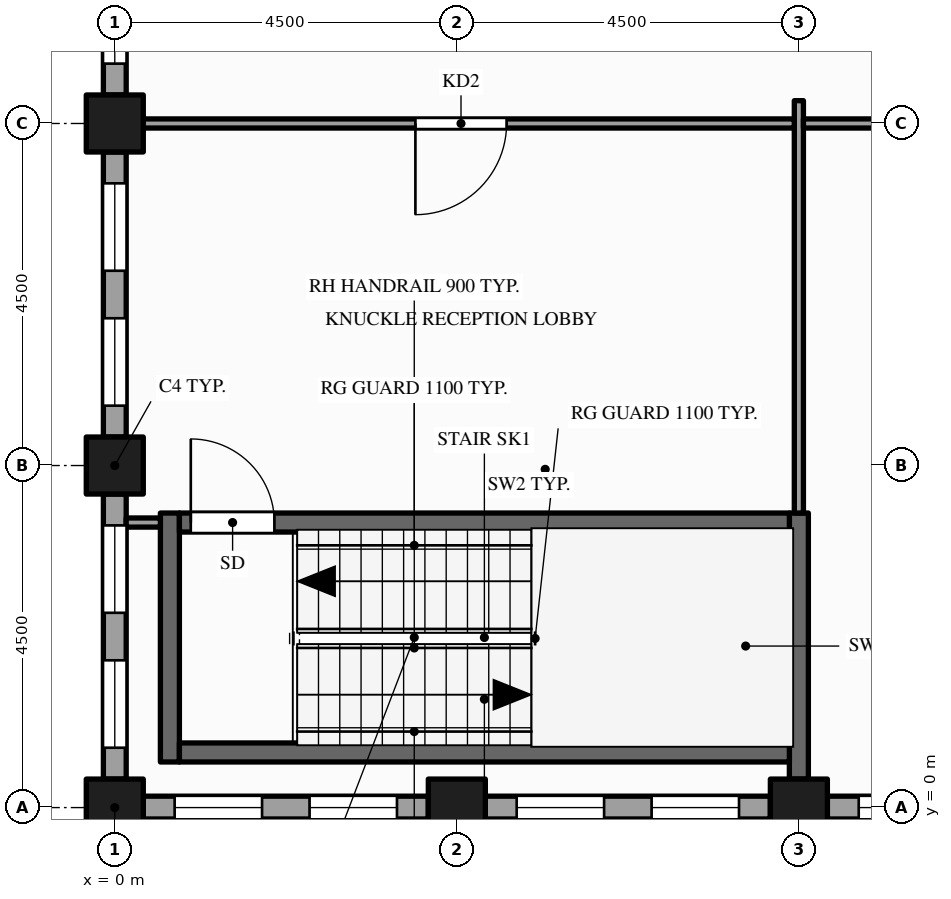
"""IFC4 building model, lengths in metres.
Left out: names, types, materials, properties, quantities, classifications, styles, units other than length and angle.
Written with IfcOpenShell. Run it as: python <this file> out.ifc"""

import sys

from ifc_helpers import new_model, si_unit, direction, frame, frame_2d, origin, origin_2d, place, context, subcontext, project, spatial, rectangle, hollow_rectangle, extrude, element, fill, save


model = new_model("IFC4")
c1 = context("Model", 3, precision=1e-05, world=origin(), true_north=direction((0.0, 1.0)))
c2 = subcontext(c1, "Body", "Model", "MODEL_VIEW")
j1 = project(units=[si_unit("LENGTHUNIT", "METRE"), si_unit("PLANEANGLEUNIT", "RADIAN")], contexts=[c1])
p1 = place(None, origin())
s1 = spatial("IfcSite", under=j1, at=p1, CompositionType="ELEMENT")
p2 = place(p1, origin())
s2 = spatial("IfcBuilding", under=s1, at=p2, CompositionType="ELEMENT")
p3 = place(p2, frame((0.0, 0.0, 195.0)))
s3 = spatial("IfcBuildingStorey", under=s2, at=p3, CompositionType="ELEMENT", Elevation=195.0)
for number, where, z_axis, x_axis in (
    (1, (0.0, 0.0, -0.15), (0.0, 0.0, 1.0), (1.0, 0.0, 0.0)),
    (2, (0.0, 4.5, -0.15), (0.0, 0.0, 1.0), (1.0, 0.0, 0.0)),
    (3, (0.0, 9.0, -0.15), (0.0, 0.0, 1.0), (1.0, 0.0, 0.0)),
    (4, (4.5, 0.0, -0.15), (0.0, 0.0, 1.0), (1.0, 0.0, 0.0)),
    (5, (9.0, 0.0, -0.15), (0.0, 0.0, 1.0), (1.0, 0.0, 0.0)),
):
    element("IfcColumn", number, at=place(p3, frame(where, z_axis=z_axis, x_axis=x_axis)), inside=s3, PredefinedType="COLUMN", context=c2, shape_type="SweptSolid", body=[
        extrude(hollow_rectangle(XDim=0.75, YDim=0.75, WallThickness=0.036, at=origin_2d()), origin(), (0.0, 0.0, 1.0), 4.0),
    ])
p4 = place(p3, frame((0.0, 13.125, 0.0), z_axis=(0.0, 0.0, 1.0), x_axis=(0.0, -1.0, 0.0)))
e6 = element("IfcWall", 6, at=p4, inside=s3, PredefinedType="STANDARD", context=c2, shape_type="SweptSolid", body=[
    extrude(rectangle(XDim=3.75, YDim=0.3, at=frame_2d((1.875, 0.0))), origin(), (0.0, 0.0, 1.0), 3.157),
])
p5 = place(p4, frame((0.413, 0.0, 0.9)))
e7 = element("IfcOpeningElement", 7, at=p5, cuts=e6, PredefinedType="OPENING", context=c2, shape_type="SweptSolid", body=[
    extrude(rectangle(XDim=1.15, YDim=2.0, at=frame_2d((0.575, 1.0))), frame((0.0, 0.16, 0.0), z_axis=(0.0, -1.0, 0.0), x_axis=(1.0, 0.0, 0.0)), (0.0, 0.0, 1.0), 0.32),
])
p6 = place(p4, frame((2.188, 0.0, 0.9)))
e8 = element("IfcOpeningElement", 8, at=p6, cuts=e6, PredefinedType="OPENING", context=c2, shape_type="SweptSolid", body=[
    extrude(rectangle(XDim=1.15, YDim=2.0, at=frame_2d((0.575, 1.0))), frame((0.0, 0.16, 0.0), z_axis=(0.0, -1.0, 0.0), x_axis=(1.0, 0.0, 0.0)), (0.0, 0.0, 1.0), 0.32),
])
p7 = place(p3, frame((0.0, 8.625, 0.0), z_axis=(0.0, 0.0, 1.0), x_axis=(0.0, -1.0, 0.0)))
e9 = element("IfcWall", 9, at=p7, inside=s3, PredefinedType="STANDARD", context=c2, shape_type="SweptSolid", body=[
    extrude(rectangle(XDim=3.75, YDim=0.3, at=frame_2d((1.875, 0.0))), origin(), (0.0, 0.0, 1.0), 3.157),
])
p8 = place(p7, frame((0.413, 0.0, 0.9)))
e10 = element("IfcOpeningElement", 10, at=p8, cuts=e9, PredefinedType="OPENING", context=c2, shape_type="SweptSolid", body=[
    extrude(rectangle(XDim=1.15, YDim=2.0, at=frame_2d((0.575, 1.0))), frame((0.0, 0.16, 0.0), z_axis=(0.0, -1.0, 0.0), x_axis=(1.0, 0.0, 0.0)), (0.0, 0.0, 1.0), 0.32),
])
p9 = place(p7, frame((2.188, 0.0, 0.9)))
e11 = element("IfcOpeningElement", 11, at=p9, cuts=e9, PredefinedType="OPENING", context=c2, shape_type="SweptSolid", body=[
    extrude(rectangle(XDim=1.15, YDim=2.0, at=frame_2d((0.575, 1.0))), frame((0.0, 0.16, 0.0), z_axis=(0.0, -1.0, 0.0), x_axis=(1.0, 0.0, 0.0)), (0.0, 0.0, 1.0), 0.32),
])
p10 = place(p3, frame((0.0, 4.125, 0.0), z_axis=(0.0, 0.0, 1.0), x_axis=(0.0, -1.0, 0.0)))
e12 = element("IfcWall", 12, at=p10, inside=s3, PredefinedType="STANDARD", context=c2, shape_type="SweptSolid", body=[
    extrude(rectangle(XDim=3.75, YDim=0.3, at=frame_2d((1.875, 0.0))), origin(), (0.0, 0.0, 1.0), 3.157),
])
p11 = place(p10, frame((0.413, 0.0, 0.9)))
e13 = element("IfcOpeningElement", 13, at=p11, cuts=e12, PredefinedType="OPENING", context=c2, shape_type="SweptSolid", body=[
    extrude(rectangle(XDim=1.15, YDim=2.0, at=frame_2d((0.575, 1.0))), frame((0.0, 0.16, 0.0), z_axis=(0.0, -1.0, 0.0), x_axis=(1.0, 0.0, 0.0)), (0.0, 0.0, 1.0), 0.32),
])
p12 = place(p10, frame((2.188, 0.0, 0.9)))
e14 = element("IfcOpeningElement", 14, at=p12, cuts=e12, PredefinedType="OPENING", context=c2, shape_type="SweptSolid", body=[
    extrude(rectangle(XDim=1.15, YDim=2.0, at=frame_2d((0.575, 1.0))), frame((0.0, 0.16, 0.0), z_axis=(0.0, -1.0, 0.0), x_axis=(1.0, 0.0, 0.0)), (0.0, 0.0, 1.0), 0.32),
])
p13 = place(p3, frame((0.375, 0.0, 0.0), z_axis=(0.0, 0.0, 1.0), x_axis=(1.0, 0.0, 0.0)))
e15 = element("IfcWall", 15, at=p13, inside=s3, PredefinedType="STANDARD", context=c2, shape_type="SweptSolid", body=[
    extrude(rectangle(XDim=3.75, YDim=0.3, at=frame_2d((1.875, 0.0))), origin(), (0.0, 0.0, 1.0), 3.157),
])
p14 = place(p13, frame((0.413, 0.0, 0.9)))
e16 = element("IfcOpeningElement", 16, at=p14, cuts=e15, PredefinedType="OPENING", context=c2, shape_type="SweptSolid", body=[
    extrude(rectangle(XDim=1.15, YDim=2.0, at=frame_2d((0.575, 1.0))), frame((0.0, 0.16, 0.0), z_axis=(0.0, -1.0, 0.0), x_axis=(1.0, 0.0, 0.0)), (0.0, 0.0, 1.0), 0.32),
])
p15 = place(p13, frame((2.188, 0.0, 0.9)))
e17 = element("IfcOpeningElement", 17, at=p15, cuts=e15, PredefinedType="OPENING", context=c2, shape_type="SweptSolid", body=[
    extrude(rectangle(XDim=1.15, YDim=2.0, at=frame_2d((0.575, 1.0))), frame((0.0, 0.16, 0.0), z_axis=(0.0, -1.0, 0.0), x_axis=(1.0, 0.0, 0.0)), (0.0, 0.0, 1.0), 0.32),
])
p16 = place(p3, frame((4.875, 0.0, 0.0), z_axis=(0.0, 0.0, 1.0), x_axis=(1.0, 0.0, 0.0)))
e18 = element("IfcWall", 18, at=p16, inside=s3, PredefinedType="STANDARD", context=c2, shape_type="SweptSolid", body=[
    extrude(rectangle(XDim=3.75, YDim=0.3, at=frame_2d((1.875, 0.0))), origin(), (0.0, 0.0, 1.0), 3.157),
])
p17 = place(p16, frame((0.413, 0.0, 0.9)))
e19 = element("IfcOpeningElement", 19, at=p17, cuts=e18, PredefinedType="OPENING", context=c2, shape_type="SweptSolid", body=[
    extrude(rectangle(XDim=1.15, YDim=2.0, at=frame_2d((0.575, 1.0))), frame((0.0, 0.16, 0.0), z_axis=(0.0, -1.0, 0.0), x_axis=(1.0, 0.0, 0.0)), (0.0, 0.0, 1.0), 0.32),
])
p18 = place(p16, frame((2.188, 0.0, 0.9)))
e20 = element("IfcOpeningElement", 20, at=p18, cuts=e18, PredefinedType="OPENING", context=c2, shape_type="SweptSolid", body=[
    extrude(rectangle(XDim=1.15, YDim=2.0, at=frame_2d((0.575, 1.0))), frame((0.0, 0.16, 0.0), z_axis=(0.0, -1.0, 0.0), x_axis=(1.0, 0.0, 0.0)), (0.0, 0.0, 1.0), 0.32),
])
p19 = place(p3, frame((9.375, 0.0, 0.0), z_axis=(0.0, 0.0, 1.0), x_axis=(1.0, 0.0, 0.0)))
e21 = element("IfcWall", 21, at=p19, inside=s3, PredefinedType="STANDARD", context=c2, shape_type="SweptSolid", body=[
    extrude(rectangle(XDim=3.75, YDim=0.3, at=frame_2d((1.875, 0.0))), origin(), (0.0, 0.0, 1.0), 2.87),
])
p20 = place(p19, frame((0.413, 0.0, 0.9)))
e22 = element("IfcOpeningElement", 22, at=p20, cuts=e21, PredefinedType="OPENING", context=c2, shape_type="SweptSolid", body=[
    extrude(rectangle(XDim=1.15, YDim=1.75, at=frame_2d((0.575, 0.875))), frame((0.0, 0.16, 0.0), z_axis=(0.0, -1.0, 0.0), x_axis=(1.0, 0.0, 0.0)), (0.0, 0.0, 1.0), 0.32),
])
p21 = place(p19, frame((2.188, 0.0, 0.9)))
e23 = element("IfcOpeningElement", 23, at=p21, cuts=e21, PredefinedType="OPENING", context=c2, shape_type="SweptSolid", body=[
    extrude(rectangle(XDim=1.15, YDim=1.75, at=frame_2d((0.575, 0.875))), frame((0.0, 0.16, 0.0), z_axis=(0.0, -1.0, 0.0), x_axis=(1.0, 0.0, 0.0)), (0.0, 0.0, 1.0), 0.32),
])
p22 = place(p3, frame((0.725, 0.6, 0.0), z_axis=(0.0, 0.0, 1.0), x_axis=(0.0, 1.0, 0.0)))
e24 = element("IfcWall", 24, at=p22, inside=s3, PredefinedType="SHEAR", context=c2, shape_type="SweptSolid", body=[
    extrude(rectangle(XDim=3.275, YDim=0.25, at=frame_2d((1.637, 0.0))), origin(), (0.0, 0.0, 1.0), 3.85),
])
p23 = place(p3, frame((9.0, 0.375, 0.0), z_axis=(0.0, 0.0, 1.0), x_axis=(0.0, 1.0, 0.0)))
e25 = element("IfcWall", 25, at=p23, inside=s3, PredefinedType="SHEAR", context=c2, shape_type="SweptSolid", body=[
    extrude(rectangle(XDim=3.5, YDim=0.25, at=frame_2d((1.75, 0.0))), origin(), (0.0, 0.0, 1.0), 3.85),
])
p24 = place(p3, frame((9.0, 3.875, 0.0), z_axis=(0.0, 0.0, 1.0), x_axis=(0.0, 1.0, 0.0)))
e26 = element("IfcWall", 26, at=p24, inside=s3, PredefinedType="PARTITIONING", context=c2, shape_type="SweptSolid", body=[
    extrude(rectangle(XDim=5.425, YDim=0.12, at=frame_2d((2.712, 0.0))), origin(), (0.0, 0.0, 1.0), 2.87),
])
p25 = place(p3, frame((0.85, 0.725, 0.0), z_axis=(0.0, 0.0, 1.0), x_axis=(1.0, 0.0, 0.0)))
e27 = element("IfcWall", 27, at=p25, inside=s3, PredefinedType="SHEAR", context=c2, shape_type="SweptSolid", body=[
    extrude(rectangle(XDim=8.025, YDim=0.25, at=frame_2d((4.012, 0.0))), origin(), (0.0, 0.0, 1.0), 3.85),
])
p26 = place(p3, frame((0.15, 3.75, 0.0), z_axis=(0.0, 0.0, 1.0), x_axis=(1.0, 0.0, 0.0)))
e28 = element("IfcWall", 28, at=p26, inside=s3, PredefinedType="PARTITIONING", context=c2, shape_type="SweptSolid", body=[
    extrude(rectangle(XDim=0.45, YDim=0.12, at=frame_2d((0.225, 0.0))), origin(), (0.0, 0.0, 1.0), 3.85),
])
p27 = place(p3, frame((0.85, 3.75, 0.0), z_axis=(0.0, 0.0, 1.0), x_axis=(1.0, 0.0, 0.0)))
e29 = element("IfcWall", 29, at=p27, inside=s3, PredefinedType="SHEAR", context=c2, shape_type="SweptSolid", body=[
    extrude(rectangle(XDim=8.025, YDim=0.25, at=frame_2d((4.012, 0.0))), origin(), (0.0, 0.0, 1.0), 3.85),
])
p28 = place(p27, frame((0.15, 0.0, 0.0)))
e30 = element("IfcOpeningElement", 30, at=p28, cuts=e29, PredefinedType="OPENING", context=c2, shape_type="SweptSolid", body=[
    extrude(rectangle(XDim=1.1, YDim=2.1, at=frame_2d((0.55, 1.05))), frame((0.0, 0.135, 0.0), z_axis=(0.0, -1.0, 0.0), x_axis=(1.0, 0.0, 0.0)), (0.0, 0.0, 1.0), 0.27),
])
p29 = place(p3, frame((0.15, 9.0, 0.0), z_axis=(0.0, 0.0, 1.0), x_axis=(1.0, 0.0, 0.0)))
e31 = element("IfcWall", 31, at=p29, inside=s3, PredefinedType="PARTITIONING", context=c2, shape_type="SweptSolid", body=[
    extrude(rectangle(XDim=8.79, YDim=0.12, at=frame_2d((4.395, 0.0))), origin(), (0.0, 0.0, 1.0), 2.87),
])
p30 = place(p29, frame((3.805, 0.0, 0.0)))
e32 = element("IfcOpeningElement", 32, at=p30, cuts=e31, PredefinedType="OPENING", context=c2, shape_type="SweptSolid", body=[
    extrude(rectangle(XDim=1.2, YDim=2.1, at=frame_2d((0.6, 1.05))), frame((0.0, 0.07, 0.0), z_axis=(0.0, -1.0, 0.0), x_axis=(1.0, 0.0, 0.0)), (0.0, 0.0, 1.0), 0.14),
])
p31 = place(p3, frame((9.06, 9.0, 0.0), z_axis=(0.0, 0.0, 1.0), x_axis=(1.0, 0.0, 0.0)))
e33 = element("IfcWall", 33, at=p31, inside=s3, PredefinedType="PARTITIONING", context=c2, shape_type="SweptSolid", body=[
    extrude(rectangle(XDim=4.38, YDim=0.12, at=frame_2d((2.19, 0.0))), origin(), (0.0, 0.0, 1.0), 2.87),
])
p32 = place(p31, frame((1.69, 0.0, 0.0)))
e34 = element("IfcOpeningElement", 34, at=p32, cuts=e33, PredefinedType="OPENING", context=c2, shape_type="SweptSolid", body=[
    extrude(rectangle(XDim=1.0, YDim=2.1, at=frame_2d((0.5, 1.05))), frame((0.0, 0.07, 0.0), z_axis=(0.0, -1.0, 0.0), x_axis=(1.0, 0.0, 0.0)), (0.0, 0.0, 1.0), 0.14),
])
p33 = place(p6, origin())
e35 = element("IfcWindow", 35, at=p33, inside=s3, PartitioningType="SINGLE_PANEL", PredefinedType="WINDOW", context=c2, shape_type="SweptSolid", body=[
    extrude(rectangle(XDim=1.15, YDim=2.0, at=frame_2d((0.575, 1.0))), frame((0.0, 0.03, 0.0), z_axis=(0.0, -1.0, 0.0), x_axis=(1.0, 0.0, 0.0)), (0.0, 0.0, 1.0), 0.06),
])
fill(e8, e35)
p34 = place(p8, origin())
e36 = element("IfcWindow", 36, at=p34, inside=s3, PartitioningType="SINGLE_PANEL", PredefinedType="WINDOW", context=c2, shape_type="SweptSolid", body=[
    extrude(rectangle(XDim=1.15, YDim=2.0, at=frame_2d((0.575, 1.0))), frame((0.0, 0.03, 0.0), z_axis=(0.0, -1.0, 0.0), x_axis=(1.0, 0.0, 0.0)), (0.0, 0.0, 1.0), 0.06),
])
fill(e10, e36)
p35 = place(p9, origin())
e37 = element("IfcWindow", 37, at=p35, inside=s3, PartitioningType="SINGLE_PANEL", PredefinedType="WINDOW", context=c2, shape_type="SweptSolid", body=[
    extrude(rectangle(XDim=1.15, YDim=2.0, at=frame_2d((0.575, 1.0))), frame((0.0, 0.03, 0.0), z_axis=(0.0, -1.0, 0.0), x_axis=(1.0, 0.0, 0.0)), (0.0, 0.0, 1.0), 0.06),
])
fill(e11, e37)
p36 = place(p11, origin())
e38 = element("IfcWindow", 38, at=p36, inside=s3, PartitioningType="SINGLE_PANEL", PredefinedType="WINDOW", context=c2, shape_type="SweptSolid", body=[
    extrude(rectangle(XDim=1.15, YDim=2.0, at=frame_2d((0.575, 1.0))), frame((0.0, 0.03, 0.0), z_axis=(0.0, -1.0, 0.0), x_axis=(1.0, 0.0, 0.0)), (0.0, 0.0, 1.0), 0.06),
])
fill(e13, e38)
p37 = place(p12, origin())
e39 = element("IfcWindow", 39, at=p37, inside=s3, PartitioningType="SINGLE_PANEL", PredefinedType="WINDOW", context=c2, shape_type="SweptSolid", body=[
    extrude(rectangle(XDim=1.15, YDim=2.0, at=frame_2d((0.575, 1.0))), frame((0.0, 0.03, 0.0), z_axis=(0.0, -1.0, 0.0), x_axis=(1.0, 0.0, 0.0)), (0.0, 0.0, 1.0), 0.06),
])
fill(e14, e39)
p38 = place(p14, origin())
e40 = element("IfcWindow", 40, at=p38, inside=s3, PartitioningType="SINGLE_PANEL", PredefinedType="WINDOW", context=c2, shape_type="SweptSolid", body=[
    extrude(rectangle(XDim=1.15, YDim=2.0, at=frame_2d((0.575, 1.0))), frame((0.0, 0.03, 0.0), z_axis=(0.0, -1.0, 0.0), x_axis=(1.0, 0.0, 0.0)), (0.0, 0.0, 1.0), 0.06),
])
fill(e16, e40)
p39 = place(p15, origin())
e41 = element("IfcWindow", 41, at=p39, inside=s3, PartitioningType="SINGLE_PANEL", PredefinedType="WINDOW", context=c2, shape_type="SweptSolid", body=[
    extrude(rectangle(XDim=1.15, YDim=2.0, at=frame_2d((0.575, 1.0))), frame((0.0, 0.03, 0.0), z_axis=(0.0, -1.0, 0.0), x_axis=(1.0, 0.0, 0.0)), (0.0, 0.0, 1.0), 0.06),
])
fill(e17, e41)
p40 = place(p17, origin())
e42 = element("IfcWindow", 42, at=p40, inside=s3, PartitioningType="SINGLE_PANEL", PredefinedType="WINDOW", context=c2, shape_type="SweptSolid", body=[
    extrude(rectangle(XDim=1.15, YDim=2.0, at=frame_2d((0.575, 1.0))), frame((0.0, 0.03, 0.0), z_axis=(0.0, -1.0, 0.0), x_axis=(1.0, 0.0, 0.0)), (0.0, 0.0, 1.0), 0.06),
])
fill(e19, e42)
p41 = place(p18, origin())
e43 = element("IfcWindow", 43, at=p41, inside=s3, PartitioningType="SINGLE_PANEL", PredefinedType="WINDOW", context=c2, shape_type="SweptSolid", body=[
    extrude(rectangle(XDim=1.15, YDim=2.0, at=frame_2d((0.575, 1.0))), frame((0.0, 0.03, 0.0), z_axis=(0.0, -1.0, 0.0), x_axis=(1.0, 0.0, 0.0)), (0.0, 0.0, 1.0), 0.06),
])
fill(e20, e43)
p42 = place(p20, origin())
e44 = element("IfcWindow", 44, at=p42, inside=s3, PartitioningType="SINGLE_PANEL", PredefinedType="WINDOW", context=c2, shape_type="SweptSolid", body=[
    extrude(rectangle(XDim=1.15, YDim=1.75, at=frame_2d((0.575, 0.875))), frame((0.0, 0.03, 0.0), z_axis=(0.0, -1.0, 0.0), x_axis=(1.0, 0.0, 0.0)), (0.0, 0.0, 1.0), 0.06),
])
fill(e22, e44)
p43 = place(p28, origin())
e45 = element("IfcDoor", 45, at=p43, inside=s3, OperationType="SINGLE_SWING_LEFT", PredefinedType="DOOR", context=c2, shape_type="SweptSolid", body=[
    extrude(rectangle(XDim=1.1, YDim=2.1, at=frame_2d((0.55, 1.05))), frame((0.0, 0.025, 0.0), z_axis=(0.0, -1.0, 0.0), x_axis=(1.0, 0.0, 0.0)), (0.0, 0.0, 1.0), 0.05),
])
fill(e30, e45)
p44 = place(p30, origin())
e46 = element("IfcDoor", 46, at=p44, inside=s3, OperationType="SINGLE_SWING_LEFT", PredefinedType="DOOR", context=c2, shape_type="SweptSolid", body=[
    extrude(rectangle(XDim=1.2, YDim=2.1, at=frame_2d((0.6, 1.05))), frame((0.0, 0.025, 0.0), z_axis=(0.0, -1.0, 0.0), x_axis=(1.0, 0.0, 0.0)), (0.0, 0.0, 1.0), 0.05),
])
fill(e32, e46)
save(model, sys.argv[1])
